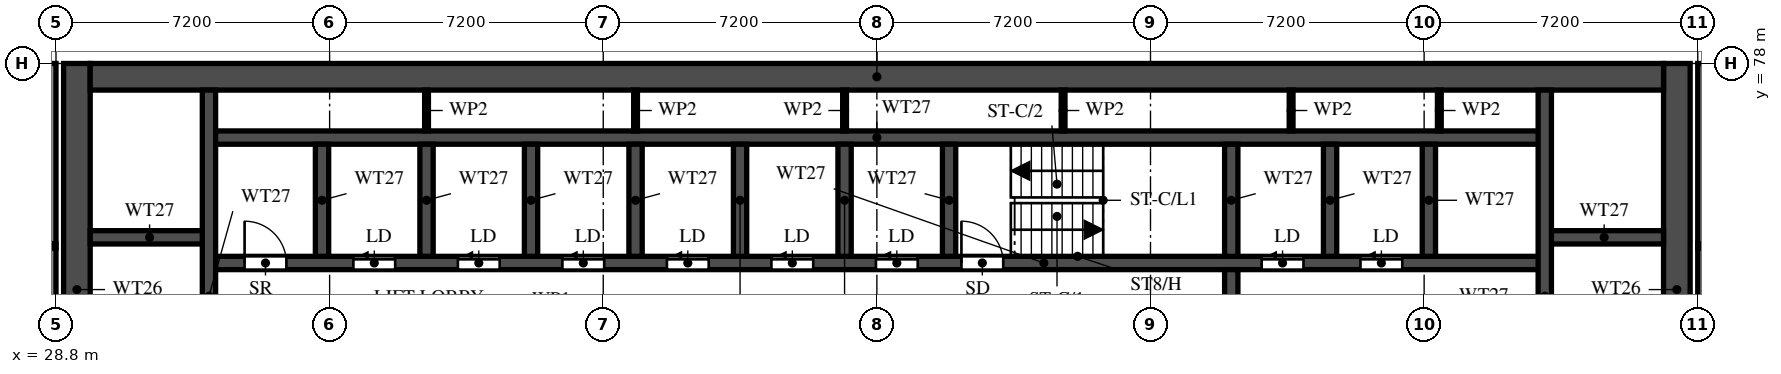
"""IFC4 building model, lengths in metres.
Left out: names, types, materials, properties, quantities, classifications, styles, units other than length and angle.
Written with IfcOpenShell. Run it as: python <this file> out.ifc"""

import sys

from ifc_helpers import new_model, si_unit, direction, frame, frame_2d, origin, place, context, subcontext, project, spatial, rectangle, extrude, element, fill, save


model = new_model("IFC4")
c1 = context("Model", 3, precision=1e-05, world=origin(), true_north=direction((0.0, 1.0)))
c2 = subcontext(c1, "Body", "Model", "MODEL_VIEW")
j1 = project(units=[si_unit("LENGTHUNIT", "METRE"), si_unit("PLANEANGLEUNIT", "RADIAN")], contexts=[c1])
p1 = place(None, origin())
s1 = spatial("IfcSite", under=j1, at=p1, CompositionType="ELEMENT")
p2 = place(p1, origin())
s2 = spatial("IfcBuilding", under=s1, at=p2, CompositionType="ELEMENT")
p3 = place(p2, frame((0.0, 0.0, 167.5)))
s3 = spatial("IfcBuildingStorey", under=s2, at=p3, CompositionType="ELEMENT", Elevation=167.5)
for number, where, z_axis, x_axis in (
    (1, (29.35, 66.1, 0.0), (0.0, 0.0, 1.0), (0.0, 1.0, 0.0)),
    (2, (71.45, 66.1, 0.0), (0.0, 0.0, 1.0), (0.0, 1.0, 0.0)),
):
    element("IfcWall", number, at=place(p3, frame(where, z_axis=z_axis, x_axis=x_axis)), inside=s3, PredefinedType="SHEAR", context=c2, shape_type="SweptSolid", body=[
        extrude(rectangle(XDim=11.9, YDim=0.7, at=frame_2d((5.95, 0.0))), origin(), (0.0, 0.0, 1.0), 3.2),
    ])
p4 = place(p3, frame((29.7, 77.65, 0.0), z_axis=(0.0, 0.0, 1.0), x_axis=(1.0, 0.0, 0.0)))
e3 = element("IfcWall", 3, at=p4, inside=s3, PredefinedType="SHEAR", context=c2, shape_type="SweptSolid", body=[
    extrude(rectangle(XDim=41.4, YDim=0.7, at=frame_2d((20.7, 0.0))), origin(), (0.0, 0.0, 1.0), 3.2),
])
p5 = place(p3, frame((32.825, 72.75, 0.0), z_axis=(0.0, 0.0, 1.0), x_axis=(1.0, 0.0, 0.0)))
e4 = element("IfcWall", 4, at=p5, inside=s3, PredefinedType="SHEAR", context=c2, shape_type="SweptSolid", body=[
    extrude(rectangle(XDim=35.15, YDim=0.35, at=frame_2d((17.575, 0.0))), origin(), (0.0, 0.0, 1.0), 3.2),
])
p6 = place(p5, frame((19.8, 0.0, 0.0)))
e5 = element("IfcOpeningElement", 5, at=p6, cuts=e4, PredefinedType="OPENING", context=c2, shape_type="SweptSolid", body=[
    extrude(rectangle(XDim=1.1, YDim=2.1, at=frame_2d((0.55, 1.05))), frame((0.0, 0.185, 0.0), z_axis=(0.0, -1.0, 0.0), x_axis=(1.0, 0.0, 0.0)), (0.0, 0.0, 1.0), 0.37),
])
p7 = place(p5, frame((27.7, 0.0, 0.0)))
e6 = element("IfcOpeningElement", 6, at=p7, cuts=e4, PredefinedType="OPENING", context=c2, shape_type="SweptSolid", body=[
    extrude(rectangle(XDim=1.1, YDim=2.1, at=frame_2d((0.55, 1.05))), frame((0.0, 0.185, 0.0), z_axis=(0.0, -1.0, 0.0), x_axis=(1.0, 0.0, 0.0)), (0.0, 0.0, 1.0), 0.37),
])
p8 = place(p5, frame((30.3, 0.0, 0.0)))
e7 = element("IfcOpeningElement", 7, at=p8, cuts=e4, PredefinedType="OPENING", context=c2, shape_type="SweptSolid", body=[
    extrude(rectangle(XDim=1.1, YDim=2.1, at=frame_2d((0.55, 1.05))), frame((0.0, 0.185, 0.0), z_axis=(0.0, -1.0, 0.0), x_axis=(1.0, 0.0, 0.0)), (0.0, 0.0, 1.0), 0.37),
])
p9 = place(p5, frame((3.8, 0.0, 0.0)))
e8 = element("IfcOpeningElement", 8, at=p9, cuts=e4, PredefinedType="OPENING", context=c2, shape_type="SweptSolid", body=[
    extrude(rectangle(XDim=1.1, YDim=2.1, at=frame_2d((0.55, 1.05))), frame((0.0, 0.185, 0.0), z_axis=(0.0, -1.0, 0.0), x_axis=(1.0, 0.0, 0.0)), (0.0, 0.0, 1.0), 0.37),
])
p10 = place(p5, frame((6.55, 0.0, 0.0)))
e9 = element("IfcOpeningElement", 9, at=p10, cuts=e4, PredefinedType="OPENING", context=c2, shape_type="SweptSolid", body=[
    extrude(rectangle(XDim=1.1, YDim=2.1, at=frame_2d((0.55, 1.05))), frame((0.0, 0.185, 0.0), z_axis=(0.0, -1.0, 0.0), x_axis=(1.0, 0.0, 0.0)), (0.0, 0.0, 1.0), 0.37),
])
p11 = place(p5, frame((9.3, 0.0, 0.0)))
e10 = element("IfcOpeningElement", 10, at=p11, cuts=e4, PredefinedType="OPENING", context=c2, shape_type="SweptSolid", body=[
    extrude(rectangle(XDim=1.1, YDim=2.1, at=frame_2d((0.55, 1.05))), frame((0.0, 0.185, 0.0), z_axis=(0.0, -1.0, 0.0), x_axis=(1.0, 0.0, 0.0)), (0.0, 0.0, 1.0), 0.37),
])
p12 = place(p5, frame((12.05, 0.0, 0.0)))
e11 = element("IfcOpeningElement", 11, at=p12, cuts=e4, PredefinedType="OPENING", context=c2, shape_type="SweptSolid", body=[
    extrude(rectangle(XDim=1.1, YDim=2.1, at=frame_2d((0.55, 1.05))), frame((0.0, 0.185, 0.0), z_axis=(0.0, -1.0, 0.0), x_axis=(1.0, 0.0, 0.0)), (0.0, 0.0, 1.0), 0.37),
])
p13 = place(p5, frame((14.8, 0.0, 0.0)))
e12 = element("IfcOpeningElement", 12, at=p13, cuts=e4, PredefinedType="OPENING", context=c2, shape_type="SweptSolid", body=[
    extrude(rectangle(XDim=1.1, YDim=2.1, at=frame_2d((0.55, 1.05))), frame((0.0, 0.185, 0.0), z_axis=(0.0, -1.0, 0.0), x_axis=(1.0, 0.0, 0.0)), (0.0, 0.0, 1.0), 0.37),
])
p14 = place(p5, frame((17.55, 0.0, 0.0)))
e13 = element("IfcOpeningElement", 13, at=p14, cuts=e4, PredefinedType="OPENING", context=c2, shape_type="SweptSolid", body=[
    extrude(rectangle(XDim=1.1, YDim=2.1, at=frame_2d((0.55, 1.05))), frame((0.0, 0.185, 0.0), z_axis=(0.0, -1.0, 0.0), x_axis=(1.0, 0.0, 0.0)), (0.0, 0.0, 1.0), 0.37),
])
p15 = place(p5, frame((0.938, 0.0, 0.0)))
e14 = element("IfcOpeningElement", 14, at=p15, cuts=e4, PredefinedType="OPENING", context=c2, shape_type="SweptSolid", body=[
    extrude(rectangle(XDim=1.1, YDim=2.1, at=frame_2d((0.55, 1.05))), frame((0.0, 0.185, 0.0), z_axis=(0.0, -1.0, 0.0), x_axis=(1.0, 0.0, 0.0)), (0.0, 0.0, 1.0), 0.37),
])
p16 = place(p3, frame((32.825, 76.05, 0.0), z_axis=(0.0, 0.0, 1.0), x_axis=(1.0, 0.0, 0.0)))
e15 = element("IfcWall", 15, at=p16, inside=s3, PredefinedType="SHEAR", context=c2, shape_type="SweptSolid", body=[
    extrude(rectangle(XDim=35.15, YDim=0.35, at=frame_2d((17.575, 0.0))), origin(), (0.0, 0.0, 1.0), 3.2),
])
for number, where, z_axis, x_axis in (
    (16, (29.7, 73.425, 0.0), (0.0, 0.0, 1.0), (1.0, 0.0, 0.0)),
    (17, (67.975, 73.425, 0.0), (0.0, 0.0, 1.0), (1.0, 0.0, 0.0)),
):
    element("IfcWall", number, at=place(p3, frame(where, z_axis=z_axis, x_axis=x_axis)), inside=s3, PredefinedType="SHEAR", context=c2, shape_type="SweptSolid", body=[
        extrude(rectangle(XDim=3.125, YDim=0.35, at=frame_2d((1.562, 0.0))), origin(), (0.0, 0.0, 1.0), 3.2),
    ])
p17 = place(p3, frame((32.825, 66.45, 0.0), z_axis=(0.0, 0.0, 1.0), x_axis=(0.0, 1.0, 0.0)))
e18 = element("IfcWall", 18, at=p17, inside=s3, PredefinedType="SHEAR", context=c2, shape_type="SweptSolid", body=[
    extrude(rectangle(XDim=10.85, YDim=0.35, at=frame_2d((5.425, 0.0))), origin(), (0.0, 0.0, 1.0), 3.2),
])
p18 = place(p3, frame((67.975, 66.45, 0.0), z_axis=(0.0, 0.0, 1.0), x_axis=(0.0, 1.0, 0.0)))
e19 = element("IfcWall", 19, at=p18, inside=s3, PredefinedType="SHEAR", context=c2, shape_type="SweptSolid", body=[
    extrude(rectangle(XDim=10.85, YDim=0.35, at=frame_2d((5.425, 0.0))), origin(), (0.0, 0.0, 1.0), 3.2),
])
p19 = place(p18, frame((0.15, 0.0, 0.0)))
e20 = element("IfcOpeningElement", 20, at=p19, cuts=e19, PredefinedType="OPENING", context=c2, shape_type="SweptSolid", body=[
    extrude(rectangle(XDim=1.1, YDim=2.1, at=frame_2d((0.55, 1.05))), frame((0.0, 0.185, 0.0), z_axis=(0.0, -1.0, 0.0), x_axis=(1.0, 0.0, 0.0)), (0.0, 0.0, 1.0), 0.37),
])
p20 = place(p3, frame((59.725, 66.45, 0.0), z_axis=(0.0, 0.0, 1.0), x_axis=(0.0, 1.0, 0.0)))
e21 = element("IfcWall", 21, at=p20, inside=s3, PredefinedType="SHEAR", context=c2, shape_type="SweptSolid", body=[
    extrude(rectangle(XDim=6.125, YDim=0.35, at=frame_2d((3.062, 0.0))), origin(), (0.0, 0.0, 1.0), 3.2),
])
p21 = place(p20, frame((3.85, 0.0, 0.0)))
e22 = element("IfcOpeningElement", 22, at=p21, cuts=e21, PredefinedType="OPENING", context=c2, shape_type="SweptSolid", body=[
    extrude(rectangle(XDim=1.2, YDim=2.1, at=frame_2d((0.6, 1.05))), frame((0.0, 0.185, 0.0), z_axis=(0.0, -1.0, 0.0), x_axis=(1.0, 0.0, 0.0)), (0.0, 0.0, 1.0), 0.37),
])
for number, where, z_axis, x_axis in (
    (23, (59.725, 72.925, 0.0), (0.0, 0.0, 1.0), (0.0, 1.0, 0.0)),
    (24, (35.8, 72.925, 0.0), (0.0, 0.0, 1.0), (0.0, 1.0, 0.0)),
    (25, (38.55, 72.925, 0.0), (0.0, 0.0, 1.0), (0.0, 1.0, 0.0)),
    (26, (41.3, 72.925, 0.0), (0.0, 0.0, 1.0), (0.0, 1.0, 0.0)),
    (27, (44.05, 72.925, 0.0), (0.0, 0.0, 1.0), (0.0, 1.0, 0.0)),
    (28, (46.8, 72.925, 0.0), (0.0, 0.0, 1.0), (0.0, 1.0, 0.0)),
    (29, (49.55, 72.925, 0.0), (0.0, 0.0, 1.0), (0.0, 1.0, 0.0)),
    (30, (52.3, 72.925, 0.0), (0.0, 0.0, 1.0), (0.0, 1.0, 0.0)),
    (31, (62.325, 72.925, 0.0), (0.0, 0.0, 1.0), (0.0, 1.0, 0.0)),
    (32, (64.925, 72.925, 0.0), (0.0, 0.0, 1.0), (0.0, 1.0, 0.0)),
):
    element("IfcWall", number, at=place(p3, frame(where, z_axis=z_axis, x_axis=x_axis)), inside=s3, PredefinedType="SHEAR", context=c2, shape_type="SweptSolid", body=[
        extrude(rectangle(XDim=2.95, YDim=0.35, at=frame_2d((1.475, 0.0))), origin(), (0.0, 0.0, 1.0), 3.2),
    ])
for number, where, z_axis, x_axis in (
    (33, (38.55, 76.225, 0.0), (0.0, 0.0, 1.0), (0.0, 1.0, 0.0)),
    (34, (44.05, 76.225, 0.0), (0.0, 0.0, 1.0), (0.0, 1.0, 0.0)),
    (35, (49.55, 76.225, 0.0), (0.0, 0.0, 1.0), (0.0, 1.0, 0.0)),
    (36, (55.3, 76.225, 0.0), (0.0, 0.0, 1.0), (0.0, 1.0, 0.0)),
    (37, (61.3, 76.225, 0.0), (0.0, 0.0, 1.0), (0.0, 1.0, 0.0)),
    (38, (65.2, 76.225, 0.0), (0.0, 0.0, 1.0), (0.0, 1.0, 0.0)),
):
    element("IfcWall", number, at=place(p3, frame(where, z_axis=z_axis, x_axis=x_axis)), inside=s3, PredefinedType="PARTITIONING", context=c2, shape_type="SweptSolid", body=[
        extrude(rectangle(XDim=1.075, YDim=0.1, at=frame_2d((0.538, 0.0))), origin(), (0.0, 0.0, 1.0), 3.2),
    ])
for number, where, z_axis, x_axis in (
    (39, (28.7, 62.4, 0.0), (0.0, 0.0, 1.0), (0.0, 1.0, 0.0)),
    (40, (72.1, 62.4, 0.0), (0.0, 0.0, 1.0), (0.0, 1.0, 0.0)),
):
    element("IfcWall", number, at=place(p3, frame(where, z_axis=z_axis, x_axis=x_axis)), inside=s3, PredefinedType="SOLIDWALL", context=c2, shape_type="SweptSolid", body=[
        extrude(rectangle(XDim=15.6, YDim=0.2, at=frame_2d((7.8, 0.0))), origin(), (0.0, 0.0, 1.0), 3.2),
    ])
p22 = place(p3, frame((14.525, 73.2, 0.0), z_axis=(0.0, 0.0, 1.0), x_axis=(1.0, 0.0, 0.0)))
e41 = element("IfcWall", 41, at=p22, inside=s3, PredefinedType="PARTITIONING", context=c2, shape_type="SweptSolid", body=[
    extrude(rectangle(XDim=14.275, YDim=0.12, at=frame_2d((7.138, 0.0))), origin(), (0.0, 0.0, 1.0), 2.3),
])
p23 = place(p22, frame((7.675, 0.0, 0.0)))
e42 = element("IfcOpeningElement", 42, at=p23, cuts=e41, PredefinedType="OPENING", context=c2, shape_type="SweptSolid", body=[
    extrude(rectangle(XDim=0.9, YDim=2.1, at=frame_2d((0.45, 1.05))), frame((0.0, 0.07, 0.0), z_axis=(0.0, -1.0, 0.0), x_axis=(1.0, 0.0, 0.0)), (0.0, 0.0, 1.0), 0.14),
])
p24 = place(p3, frame((72.0, 73.2, 0.0), z_axis=(0.0, 0.0, 1.0), x_axis=(1.0, 0.0, 0.0)))
e43 = element("IfcWall", 43, at=p24, inside=s3, PredefinedType="PARTITIONING", context=c2, shape_type="SweptSolid", body=[
    extrude(rectangle(XDim=14.275, YDim=0.12, at=frame_2d((7.137, 0.0))), origin(), (0.0, 0.0, 1.0), 2.3),
])
p25 = place(p24, frame((5.7, 0.0, 0.0)))
e44 = element("IfcOpeningElement", 44, at=p25, cuts=e43, PredefinedType="OPENING", context=c2, shape_type="SweptSolid", body=[
    extrude(rectangle(XDim=0.9, YDim=2.1, at=frame_2d((0.45, 1.05))), frame((0.0, 0.07, 0.0), z_axis=(0.0, -1.0, 0.0), x_axis=(1.0, 0.0, 0.0)), (0.0, 0.0, 1.0), 0.14),
])
p26 = place(p6, origin())
e45 = element("IfcDoor", 45, at=p26, inside=s3, OperationType="SINGLE_SWING_LEFT", PredefinedType="DOOR", context=c2, shape_type="SweptSolid", body=[
    extrude(rectangle(XDim=1.1, YDim=2.1, at=frame_2d((0.55, 1.05))), frame((0.0, 0.025, 0.0), z_axis=(0.0, -1.0, 0.0), x_axis=(1.0, 0.0, 0.0)), (0.0, 0.0, 1.0), 0.05),
])
fill(e5, e45)
p27 = place(p7, origin())
e46 = element("IfcDoor", 46, at=p27, inside=s3, OperationType="SLIDING_TO_LEFT", PredefinedType="DOOR", context=c2, shape_type="SweptSolid", body=[
    extrude(rectangle(XDim=1.1, YDim=2.1, at=frame_2d((0.55, 1.05))), frame((0.0, 0.025, 0.0), z_axis=(0.0, -1.0, 0.0), x_axis=(1.0, 0.0, 0.0)), (0.0, 0.0, 1.0), 0.05),
])
fill(e6, e46)
p28 = place(p8, origin())
e47 = element("IfcDoor", 47, at=p28, inside=s3, OperationType="SLIDING_TO_LEFT", PredefinedType="DOOR", context=c2, shape_type="SweptSolid", body=[
    extrude(rectangle(XDim=1.1, YDim=2.1, at=frame_2d((0.55, 1.05))), frame((0.0, 0.025, 0.0), z_axis=(0.0, -1.0, 0.0), x_axis=(1.0, 0.0, 0.0)), (0.0, 0.0, 1.0), 0.05),
])
fill(e7, e47)
p29 = place(p9, origin())
e48 = element("IfcDoor", 48, at=p29, inside=s3, OperationType="SLIDING_TO_LEFT", PredefinedType="DOOR", context=c2, shape_type="SweptSolid", body=[
    extrude(rectangle(XDim=1.1, YDim=2.1, at=frame_2d((0.55, 1.05))), frame((0.0, 0.025, 0.0), z_axis=(0.0, -1.0, 0.0), x_axis=(1.0, 0.0, 0.0)), (0.0, 0.0, 1.0), 0.05),
])
fill(e8, e48)
p30 = place(p10, origin())
e49 = element("IfcDoor", 49, at=p30, inside=s3, OperationType="SLIDING_TO_LEFT", PredefinedType="DOOR", context=c2, shape_type="SweptSolid", body=[
    extrude(rectangle(XDim=1.1, YDim=2.1, at=frame_2d((0.55, 1.05))), frame((0.0, 0.025, 0.0), z_axis=(0.0, -1.0, 0.0), x_axis=(1.0, 0.0, 0.0)), (0.0, 0.0, 1.0), 0.05),
])
fill(e9, e49)
p31 = place(p11, origin())
e50 = element("IfcDoor", 50, at=p31, inside=s3, OperationType="SLIDING_TO_LEFT", PredefinedType="DOOR", context=c2, shape_type="SweptSolid", body=[
    extrude(rectangle(XDim=1.1, YDim=2.1, at=frame_2d((0.55, 1.05))), frame((0.0, 0.025, 0.0), z_axis=(0.0, -1.0, 0.0), x_axis=(1.0, 0.0, 0.0)), (0.0, 0.0, 1.0), 0.05),
])
fill(e10, e50)
p32 = place(p12, origin())
e51 = element("IfcDoor", 51, at=p32, inside=s3, OperationType="SLIDING_TO_LEFT", PredefinedType="DOOR", context=c2, shape_type="SweptSolid", body=[
    extrude(rectangle(XDim=1.1, YDim=2.1, at=frame_2d((0.55, 1.05))), frame((0.0, 0.025, 0.0), z_axis=(0.0, -1.0, 0.0), x_axis=(1.0, 0.0, 0.0)), (0.0, 0.0, 1.0), 0.05),
])
fill(e11, e51)
p33 = place(p13, origin())
e52 = element("IfcDoor", 52, at=p33, inside=s3, OperationType="SLIDING_TO_LEFT", PredefinedType="DOOR", context=c2, shape_type="SweptSolid", body=[
    extrude(rectangle(XDim=1.1, YDim=2.1, at=frame_2d((0.55, 1.05))), frame((0.0, 0.025, 0.0), z_axis=(0.0, -1.0, 0.0), x_axis=(1.0, 0.0, 0.0)), (0.0, 0.0, 1.0), 0.05),
])
fill(e12, e52)
p34 = place(p14, origin())
e53 = element("IfcDoor", 53, at=p34, inside=s3, OperationType="SLIDING_TO_LEFT", PredefinedType="DOOR", context=c2, shape_type="SweptSolid", body=[
    extrude(rectangle(XDim=1.1, YDim=2.1, at=frame_2d((0.55, 1.05))), frame((0.0, 0.025, 0.0), z_axis=(0.0, -1.0, 0.0), x_axis=(1.0, 0.0, 0.0)), (0.0, 0.0, 1.0), 0.05),
])
fill(e13, e53)
p35 = place(p15, origin())
e54 = element("IfcDoor", 54, at=p35, inside=s3, OperationType="SINGLE_SWING_LEFT", PredefinedType="DOOR", context=c2, shape_type="SweptSolid", body=[
    extrude(rectangle(XDim=1.1, YDim=2.1, at=frame_2d((0.55, 1.05))), frame((0.0, 0.025, 0.0), z_axis=(0.0, -1.0, 0.0), x_axis=(1.0, 0.0, 0.0)), (0.0, 0.0, 1.0), 0.05),
])
fill(e14, e54)
save(model, sys.argv[1])
